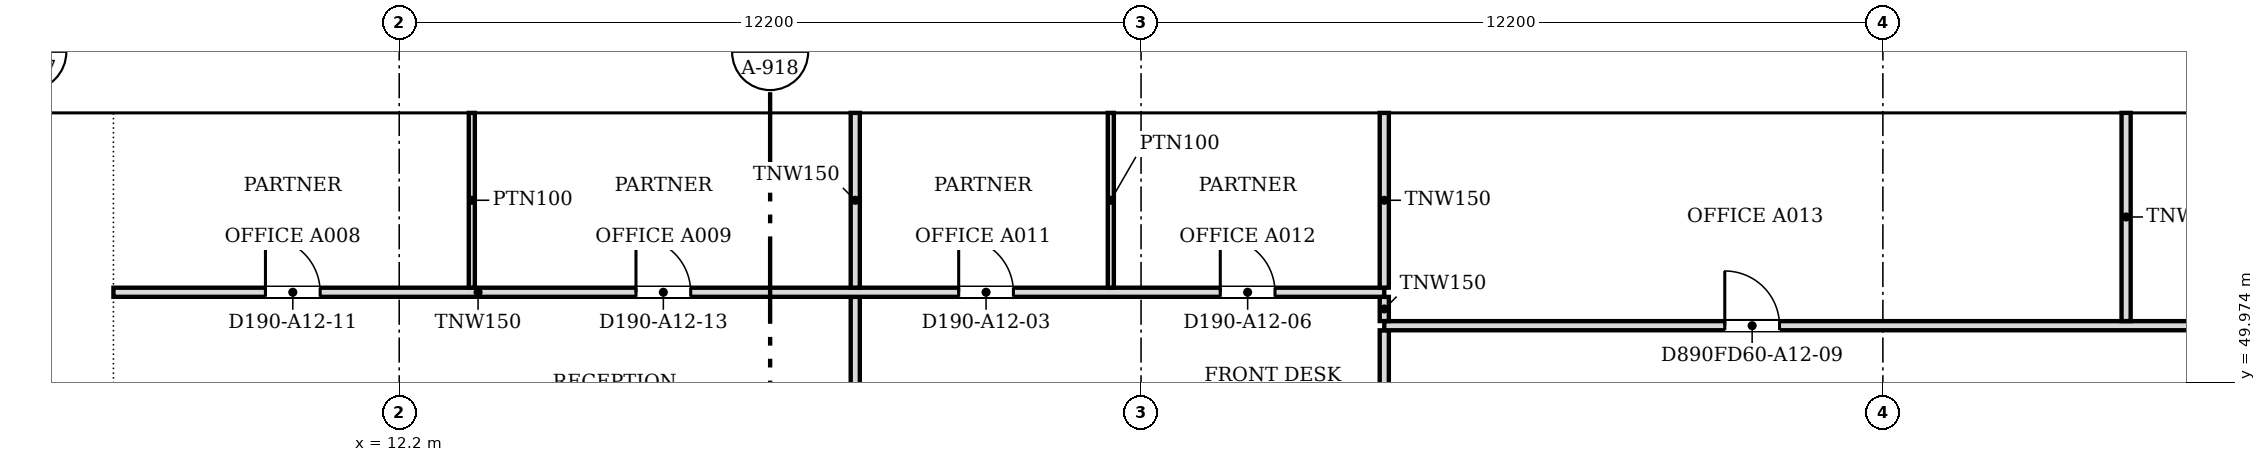
"""IFC4 building model, lengths in metres.
Left out: names, types, materials, properties, quantities, classifications, styles, units other than length and angle.
Written with IfcOpenShell. Run it as: python <this file> out.ifc"""

import sys

from ifc_helpers import new_model, si_unit, direction, frame, frame_2d, origin, place, context, subcontext, project, spatial, polyline, rectangle, outline, extrude, faceted_brep, source, transform, mapped, element, fill, save


model = new_model("IFC4")
c1 = context("Model", 3, precision=1e-05, world=origin(), true_north=direction((0.0, 1.0)))
c2 = subcontext(c1, "Body", "Model", "MODEL_VIEW")
j1 = project(units=[si_unit("LENGTHUNIT", "METRE"), si_unit("PLANEANGLEUNIT", "RADIAN")], contexts=[c1])
p1 = place(None, origin())
s1 = spatial("IfcSite", under=j1, at=p1, CompositionType="ELEMENT")
p2 = place(p1, origin())
s2 = spatial("IfcBuilding", under=s1, at=p2, CompositionType="ELEMENT")
p3 = place(p2, frame((0.0, 0.0, 135.4)))
s3 = spatial("IfcBuildingStorey", under=s2, at=p3, CompositionType="ELEMENT", Elevation=135.4)
m1 = source(origin(), c2, "Body", "SweptSolid", [
    extrude(outline(polyline([(3.05, 0.0), (6.1, 3.8), (3.05, 7.6), (0.0, 3.8), (3.05, 0.0)])), frame((0.0, 0.25, 0.0), z_axis=(0.0, -1.0, 0.0), x_axis=(1.0, 0.0, 0.0)), (0.0, 0.0, 1.0), 0.5),
])
p4 = place(p3, frame((45.75, 54.65, -3.8), z_axis=(0.0, 0.0, 1.0), x_axis=(-1.0, 0.0, 0.0)))
e1 = element("IfcWall", 1, at=p4, inside=s3, PredefinedType="SOLIDWALL", context=c2, shape_type="MappedRepresentation", body=[
    mapped(m1, transform((0.0, 0.0, 0.0), scale=1.0)),
])
m2 = source(origin(), c2, "Body", "SweptSolid", [
    extrude(outline(polyline([(3.05, 0.399), (5.78, 3.8), (3.05, 7.2), (0.321, 3.8), (3.05, 0.399)])), frame((0.0, 0.26, 0.0), z_axis=(0.0, -1.0, 0.0), x_axis=(1.0, 0.0, 0.0)), (0.0, 0.0, 1.0), 0.52),
])
p5 = place(p4, origin())
e2 = element("IfcOpeningElement", 2, at=p5, cuts=e1, PredefinedType="OPENING", context=c2, shape_type="MappedRepresentation", body=[
    mapped(m2, transform((0.0, 0.0, 0.0), scale=1.0)),
])
m3 = source(origin(), c2, "Body", "Brep", [
    faceted_brep([(3.05, -0.25, 0.0), (6.1, -0.25, 3.8), (6.1, -0.25, 3.8), (3.05, -0.25, 7.6), (0.0, -0.25, 3.8), (0.0, 0.25, 3.8), (3.05, 0.25, 7.6), (6.1, 0.25, 3.8), (6.1, 0.25, 3.8), (3.05, 0.25, 0.0)], [[[0, 1, 2, 3, 4]], [[5, 6, 7, 8, 9]], [[9, 8, 1, 0]], [[7, 6, 3, 2]], [[6, 5, 4, 3]], [[5, 9, 0, 4]], [[1, 8, 7, 2]]]),
])
p6 = place(p3, frame((39.65, 54.65, -3.8), z_axis=(0.0, 0.0, 1.0), x_axis=(-1.0, 0.0, 0.0)))
e3 = element("IfcWall", 3, at=p6, inside=s3, PredefinedType="SOLIDWALL", context=c2, shape_type="MappedRepresentation", body=[
    mapped(m3, transform((0.0, 0.0, 0.0), scale=1.0)),
])
p7 = place(p6, origin())
e4 = element("IfcOpeningElement", 4, at=p7, cuts=e3, PredefinedType="OPENING", context=c2, shape_type="MappedRepresentation", body=[
    mapped(m2, transform((0.0, 0.0, 0.0), scale=1.0)),
])
p8 = place(p3, frame((33.55, 54.65, -3.8), z_axis=(0.0, 0.0, 1.0), x_axis=(-1.0, 0.0, 0.0)))
e5 = element("IfcWall", 5, at=p8, inside=s3, PredefinedType="SOLIDWALL", context=c2, shape_type="MappedRepresentation", body=[
    mapped(m1, transform((0.0, 0.0, 0.0), scale=1.0)),
])
p9 = place(p8, origin())
e6 = element("IfcOpeningElement", 6, at=p9, cuts=e5, PredefinedType="OPENING", context=c2, shape_type="MappedRepresentation", body=[
    mapped(m2, transform((0.0, 0.0, 0.0), scale=1.0)),
])
p10 = place(p3, frame((27.45, 54.65, -3.8), z_axis=(0.0, 0.0, 1.0), x_axis=(-1.0, 0.0, 0.0)))
e7 = element("IfcWall", 7, at=p10, inside=s3, PredefinedType="SOLIDWALL", context=c2, shape_type="MappedRepresentation", body=[
    mapped(m3, transform((0.0, 0.0, 0.0), scale=1.0)),
])
p11 = place(p10, origin())
e8 = element("IfcOpeningElement", 8, at=p11, cuts=e7, PredefinedType="OPENING", context=c2, shape_type="MappedRepresentation", body=[
    mapped(m2, transform((0.0, 0.0, 0.0), scale=1.0)),
])
p12 = place(p3, frame((21.35, 54.65, -3.8), z_axis=(0.0, 0.0, 1.0), x_axis=(-1.0, 0.0, 0.0)))
e9 = element("IfcWall", 9, at=p12, inside=s3, PredefinedType="SOLIDWALL", context=c2, shape_type="MappedRepresentation", body=[
    mapped(m1, transform((0.0, 0.0, 0.0), scale=1.0)),
])
p13 = place(p12, origin())
e10 = element("IfcOpeningElement", 10, at=p13, cuts=e9, PredefinedType="OPENING", context=c2, shape_type="MappedRepresentation", body=[
    mapped(m2, transform((0.0, 0.0, 0.0), scale=1.0)),
])
p14 = place(p3, frame((15.25, 54.65, -3.8), z_axis=(0.0, 0.0, 1.0), x_axis=(-1.0, 0.0, 0.0)))
e11 = element("IfcWall", 11, at=p14, inside=s3, PredefinedType="SOLIDWALL", context=c2, shape_type="MappedRepresentation", body=[
    mapped(m1, transform((0.0, 0.0, 0.0), scale=1.0)),
])
p15 = place(p14, origin())
e12 = element("IfcOpeningElement", 12, at=p15, cuts=e11, PredefinedType="OPENING", context=c2, shape_type="MappedRepresentation", body=[
    mapped(m2, transform((0.0, 0.0, 0.0), scale=1.0)),
])
m4 = source(origin(), c2, "Body", "Brep", [
    faceted_brep([(3.003, -0.25, 0.0), (3.05, -0.25, 0.06), (3.05, -0.25, 7.54), (3.003, -0.25, 7.6), (0.0, -0.25, 3.8), (0.0, 0.25, 3.8), (2.957, 0.25, 7.541), (2.957, 0.25, 0.059), (3.003, 0.0, 0.0), (3.003, 0.0, 7.6)], [[[0, 1, 2, 3, 4]], [[5, 6, 7]], [[1, 0, 8]], [[9, 3, 2]], [[6, 5, 4, 3, 9]], [[5, 7, 8, 0, 4]], [[1, 8, 7, 6, 9, 2]]]),
])
p16 = place(p3, frame((9.15, 54.65, -3.8), z_axis=(0.0, 0.0, 1.0), x_axis=(-1.0, 0.0, 0.0)))
e13 = element("IfcWall", 13, at=p16, inside=s3, PredefinedType="SOLIDWALL", context=c2, shape_type="MappedRepresentation", body=[
    mapped(m4, transform((0.0, 0.0, 0.0), scale=1.0)),
])
m5 = source(origin(), c2, "Body", "SweptSolid", [
    extrude(outline(polyline([(2.803, 6.944), (0.319, 3.8), (2.803, 0.656), (2.803, 6.944)])), frame((0.0, 0.26, 0.0), z_axis=(0.0, -1.0, 0.0), x_axis=(1.0, 0.0, 0.0)), (0.0, 0.0, 1.0), 0.52),
])
p17 = place(p16, origin())
e14 = element("IfcOpeningElement", 14, at=p17, cuts=e13, PredefinedType="OPENING", context=c2, shape_type="MappedRepresentation", body=[
    mapped(m5, transform((0.0, 0.0, 0.0), scale=1.0)),
])
p18 = place(p2, frame((0.0, 0.0, 139.2)))
s4 = spatial("IfcBuildingStorey", under=s2, at=p18, CompositionType="ELEMENT", Elevation=139.2)
m6 = source(origin(), c2, "Body", "Brep", [
    faceted_brep([(3.05, -0.25, 0.0), (6.1, -0.25, 3.8), (6.1, -0.25, 3.8), (3.05, -0.25, 7.6), (0.0, -0.25, 3.8), (0.0, 0.25, 3.8), (3.05, 0.25, 7.6), (6.1, 0.25, 3.8), (6.1, 0.25, 3.8), (3.05, 0.25, 0.0)], [[[0, 1, 2, 3, 4]], [[5, 6, 7, 8, 9]], [[9, 8, 1, 0]], [[7, 6, 3, 2]], [[6, 5, 4, 3]], [[5, 9, 0, 4]], [[1, 8, 7, 2]]]),
])
p19 = place(p18, frame((42.7, 54.65, -3.8), z_axis=(0.0, 0.0, 1.0), x_axis=(-1.0, 0.0, 0.0)))
e15 = element("IfcWall", 15, at=p19, inside=s4, PredefinedType="SOLIDWALL", context=c2, shape_type="MappedRepresentation", body=[
    mapped(m6, transform((0.0, 0.0, 0.0), scale=1.0)),
])
m7 = source(origin(), c2, "Body", "SweptSolid", [
    extrude(outline(polyline([(3.05, 0.399), (5.78, 3.8), (3.05, 7.201), (0.321, 3.8), (3.05, 0.399)])), frame((0.0, 0.26, 0.0), z_axis=(0.0, -1.0, 0.0), x_axis=(1.0, 0.0, 0.0)), (0.0, 0.0, 1.0), 0.52),
])
p20 = place(p19, origin())
e16 = element("IfcOpeningElement", 16, at=p20, cuts=e15, PredefinedType="OPENING", context=c2, shape_type="MappedRepresentation", body=[
    mapped(m7, transform((0.0, 0.0, 0.0), scale=1.0)),
])
m8 = source(origin(), c2, "Body", "SweptSolid", [
    extrude(outline(polyline([(3.05, 0.0), (6.1, 3.8), (3.05, 7.6), (0.0, 3.8), (3.05, 0.0)])), frame((0.0, 0.25, 0.0), z_axis=(0.0, -1.0, 0.0), x_axis=(1.0, 0.0, 0.0)), (0.0, 0.0, 1.0), 0.5),
])
p21 = place(p18, frame((36.6, 54.65, -3.8), z_axis=(0.0, 0.0, 1.0), x_axis=(-1.0, 0.0, 0.0)))
e17 = element("IfcWall", 17, at=p21, inside=s4, PredefinedType="SOLIDWALL", context=c2, shape_type="MappedRepresentation", body=[
    mapped(m8, transform((0.0, 0.0, 0.0), scale=1.0)),
])
p22 = place(p21, origin())
e18 = element("IfcOpeningElement", 18, at=p22, cuts=e17, PredefinedType="OPENING", context=c2, shape_type="MappedRepresentation", body=[
    mapped(m7, transform((0.0, 0.0, 0.0), scale=1.0)),
])
p23 = place(p18, frame((30.5, 54.65, -3.8), z_axis=(0.0, 0.0, 1.0), x_axis=(-1.0, 0.0, 0.0)))
e19 = element("IfcWall", 19, at=p23, inside=s4, PredefinedType="SOLIDWALL", context=c2, shape_type="MappedRepresentation", body=[
    mapped(m8, transform((0.0, 0.0, 0.0), scale=1.0)),
])
p24 = place(p23, origin())
e20 = element("IfcOpeningElement", 20, at=p24, cuts=e19, PredefinedType="OPENING", context=c2, shape_type="MappedRepresentation", body=[
    mapped(m7, transform((0.0, 0.0, 0.0), scale=1.0)),
])
p25 = place(p18, frame((24.4, 54.65, -3.8), z_axis=(0.0, 0.0, 1.0), x_axis=(-1.0, 0.0, 0.0)))
e21 = element("IfcWall", 21, at=p25, inside=s4, PredefinedType="SOLIDWALL", context=c2, shape_type="MappedRepresentation", body=[
    mapped(m6, transform((0.0, 0.0, 0.0), scale=1.0)),
])
p26 = place(p25, origin())
e22 = element("IfcOpeningElement", 22, at=p26, cuts=e21, PredefinedType="OPENING", context=c2, shape_type="MappedRepresentation", body=[
    mapped(m7, transform((0.0, 0.0, 0.0), scale=1.0)),
])
p27 = place(p18, frame((18.3, 54.65, -3.8), z_axis=(0.0, 0.0, 1.0), x_axis=(-1.0, 0.0, 0.0)))
e23 = element("IfcWall", 23, at=p27, inside=s4, PredefinedType="SOLIDWALL", context=c2, shape_type="MappedRepresentation", body=[
    mapped(m8, transform((0.0, 0.0, 0.0), scale=1.0)),
])
p28 = place(p27, origin())
e24 = element("IfcOpeningElement", 24, at=p28, cuts=e23, PredefinedType="OPENING", context=c2, shape_type="MappedRepresentation", body=[
    mapped(m7, transform((0.0, 0.0, 0.0), scale=1.0)),
])
m9 = source(origin(), c2, "Body", "Brep", [
    faceted_brep([(3.05, -0.25, 0.0), (6.053, -0.25, 3.8), (3.05, -0.25, 7.6), (0.0, -0.25, 3.8), (0.0, 0.25, 3.8), (3.05, 0.25, 7.6), (6.007, 0.25, 3.859), (6.007, 0.25, 3.741), (3.05, 0.25, 0.0), (6.053, 0.0, 3.8)], [[[0, 1, 2, 3]], [[4, 5, 6, 7, 8]], [[8, 7, 9, 1, 0]], [[6, 5, 2, 1, 9]], [[5, 4, 3, 2]], [[4, 8, 0, 3]], [[9, 7, 6]]]),
])
p29 = place(p18, frame((12.2, 54.65, -3.8), z_axis=(0.0, 0.0, 1.0), x_axis=(-1.0, 0.0, 0.0)))
e25 = element("IfcWall", 25, at=p29, inside=s4, PredefinedType="SOLIDWALL", context=c2, shape_type="MappedRepresentation", body=[
    mapped(m9, transform((0.0, 0.0, 0.0), scale=1.0)),
])
m10 = source(origin(), c2, "Body", "SweptSolid", [
    extrude(outline(polyline([(3.049, 0.401), (5.735, 3.8), (3.049, 7.199), (0.321, 3.8), (3.049, 0.401)])), frame((0.0, 0.26, 0.0), z_axis=(0.0, -1.0, 0.0), x_axis=(1.0, 0.0, 0.0)), (0.0, 0.0, 1.0), 0.52),
])
p30 = place(p29, origin())
e26 = element("IfcOpeningElement", 26, at=p30, cuts=e25, PredefinedType="OPENING", context=c2, shape_type="MappedRepresentation", body=[
    mapped(m10, transform((0.0, 0.0, 0.0), scale=1.0)),
])
p31 = place(p3, frame((19.7, 48.176, 0.0), z_axis=(0.0, 0.0, 1.0), x_axis=(0.0, 1.0, 0.0)))
e27 = element("IfcWall", 27, at=p31, inside=s3, PredefinedType="PARTITIONING", context=c2, shape_type="SweptSolid", body=[
    extrude(rectangle(XDim=3.198, YDim=0.15, at=frame_2d((1.599, 0.0))), origin(), (0.0, 0.0, 1.0), 3.067),
])
p32 = place(p3, frame((28.4, 48.176, 0.0), z_axis=(0.0, 0.0, 1.0), x_axis=(0.0, 1.0, 0.0)))
e28 = element("IfcWall", 28, at=p32, inside=s3, PredefinedType="PARTITIONING", context=c2, shape_type="SweptSolid", body=[
    extrude(rectangle(XDim=2.648, YDim=0.15, at=frame_2d((1.324, 0.0))), origin(), (0.0, 0.0, 1.0), 3.067),
])
p33 = place(p3, frame((28.4, 50.9, 0.0), z_axis=(0.0, 0.0, 1.0), x_axis=(1.0, 0.0, 0.0)))
e29 = element("IfcWall", 29, at=p33, inside=s3, PredefinedType="PARTITIONING", context=c2, shape_type="SweptSolid", body=[
    extrude(rectangle(XDim=31.254, YDim=0.15, at=frame_2d((15.627, 0.0))), origin(), (0.0, 0.0, 1.0), 3.067),
])
m11 = source(origin(), c2, "Body", "SweptSolid", [
    extrude(rectangle(XDim=0.9, YDim=2.1, at=frame_2d((0.45, 1.05))), frame((0.0, 0.085, 0.0), z_axis=(0.0, -1.0, 0.0), x_axis=(1.0, 0.0, 0.0)), (0.0, 0.0, 1.0), 0.17),
])
p34 = place(p33, frame((5.6, 0.0, 0.0)))
e30 = element("IfcOpeningElement", 30, at=p34, cuts=e29, PredefinedType="OPENING", context=c2, shape_type="MappedRepresentation", body=[
    mapped(m11, transform((0.0, 0.0, 0.0), scale=1.0)),
])
p35 = place(p33, frame((21.3, 0.0, 0.0)))
e31 = element("IfcOpeningElement", 31, at=p35, cuts=e29, PredefinedType="OPENING", context=c2, shape_type="MappedRepresentation", body=[
    mapped(m11, transform((0.0, 0.0, 0.0), scale=1.0)),
])
p36 = place(p3, frame((28.4, 50.976, 0.0), z_axis=(0.0, 0.0, 1.0), x_axis=(0.0, 1.0, 0.0)))
e32 = element("IfcWall", 32, at=p36, inside=s3, PredefinedType="PARTITIONING", context=c2, shape_type="SweptSolid", body=[
    extrude(rectangle(XDim=0.398, YDim=0.15, at=frame_2d((0.199, 0.0))), origin(), (0.0, 0.0, 1.0), 3.067),
])
p37 = place(p3, frame((40.6, 50.976, 0.0), z_axis=(0.0, 0.0, 1.0), x_axis=(0.0, 1.0, 0.0)))
e33 = element("IfcWall", 33, at=p37, inside=s3, PredefinedType="PARTITIONING", context=c2, shape_type="SweptSolid", body=[
    extrude(rectangle(XDim=3.424, YDim=0.15, at=frame_2d((1.712, 0.0))), origin(), (0.0, 0.0, 1.0), 3.067),
])
p38 = place(p3, frame((7.5, 51.45, 0.0), z_axis=(0.0, 0.0, 1.0), x_axis=(1.0, 0.0, 0.0)))
e34 = element("IfcWall", 34, at=p38, inside=s3, PredefinedType="PARTITIONING", context=c2, shape_type="SweptSolid", body=[
    extrude(rectangle(XDim=20.9, YDim=0.15, at=frame_2d((10.45, 0.0))), origin(), (0.0, 0.0, 1.0), 3.067),
])
p39 = place(p38, frame((13.901, 0.0, 0.0)))
e35 = element("IfcOpeningElement", 35, at=p39, cuts=e34, PredefinedType="OPENING", context=c2, shape_type="MappedRepresentation", body=[
    mapped(m11, transform((0.0, 0.0, 0.0), scale=1.0)),
])
p40 = place(p38, frame((18.203, 0.0, 0.0)))
e36 = element("IfcOpeningElement", 36, at=p40, cuts=e34, PredefinedType="OPENING", context=c2, shape_type="MappedRepresentation", body=[
    mapped(m11, transform((0.0, 0.0, 0.0), scale=1.0)),
])
p41 = place(p38, frame((2.5, 0.0, 0.0)))
e37 = element("IfcOpeningElement", 37, at=p41, cuts=e34, PredefinedType="OPENING", context=c2, shape_type="MappedRepresentation", body=[
    mapped(m11, transform((0.0, 0.0, 0.0), scale=1.0)),
])
p42 = place(p38, frame((8.594, 0.0, 0.0)))
e38 = element("IfcOpeningElement", 38, at=p42, cuts=e34, PredefinedType="OPENING", context=c2, shape_type="MappedRepresentation", body=[
    mapped(m11, transform((0.0, 0.0, 0.0), scale=1.0)),
])
p43 = place(p3, frame((13.394, 51.526, 0.0), z_axis=(0.0, 0.0, 1.0), x_axis=(0.0, 1.0, 0.0)))
e39 = element("IfcWall", 39, at=p43, inside=s3, PredefinedType="PARTITIONING", context=c2, shape_type="SweptSolid", body=[
    extrude(rectangle(XDim=2.874, YDim=0.1, at=frame_2d((1.437, 0.0))), origin(), (0.0, 0.0, 1.0), 3.067),
])
p44 = place(p3, frame((19.7, 51.526, 0.0), z_axis=(0.0, 0.0, 1.0), x_axis=(0.0, 1.0, 0.0)))
e40 = element("IfcWall", 40, at=p44, inside=s3, PredefinedType="PARTITIONING", context=c2, shape_type="SweptSolid", body=[
    extrude(rectangle(XDim=2.874, YDim=0.15, at=frame_2d((1.437, 0.0))), origin(), (0.0, 0.0, 1.0), 3.067),
])
p45 = place(p3, frame((23.903, 51.526, 0.0), z_axis=(0.0, 0.0, 1.0), x_axis=(0.0, 1.0, 0.0)))
e41 = element("IfcWall", 41, at=p45, inside=s3, PredefinedType="PARTITIONING", context=c2, shape_type="SweptSolid", body=[
    extrude(rectangle(XDim=2.874, YDim=0.1, at=frame_2d((1.437, 0.0))), origin(), (0.0, 0.0, 1.0), 3.067),
])
p46 = place(p3, frame((28.4, 51.526, 0.0), z_axis=(0.0, 0.0, 1.0), x_axis=(0.0, 1.0, 0.0)))
e42 = element("IfcWall", 42, at=p46, inside=s3, PredefinedType="PARTITIONING", context=c2, shape_type="SweptSolid", body=[
    extrude(rectangle(XDim=2.874, YDim=0.15, at=frame_2d((1.437, 0.0))), origin(), (0.0, 0.0, 1.0), 3.067),
])
m12 = source(origin(), c2, "Body", "SweptSolid", [
    extrude(rectangle(XDim=0.9, YDim=2.1, at=frame_2d((0.45, 1.05))), frame((0.0, 0.025, 0.0), z_axis=(0.0, -1.0, 0.0), x_axis=(1.0, 0.0, 0.0)), (0.0, 0.0, 1.0), 0.05),
])
p47 = place(p39, origin())
e43 = element("IfcDoor", 43, at=p47, inside=s3, OperationType="SINGLE_SWING_LEFT", PredefinedType="DOOR", context=c2, shape_type="MappedRepresentation", body=[
    mapped(m12, transform((0.0, 0.0, 0.0), scale=1.0)),
])
fill(e35, e43)
p48 = place(p40, origin())
e44 = element("IfcDoor", 44, at=p48, inside=s3, OperationType="SINGLE_SWING_LEFT", PredefinedType="DOOR", context=c2, shape_type="MappedRepresentation", body=[
    mapped(m12, transform((0.0, 0.0, 0.0), scale=1.0)),
])
fill(e36, e44)
p49 = place(p41, origin())
e45 = element("IfcDoor", 45, at=p49, inside=s3, OperationType="SINGLE_SWING_LEFT", PredefinedType="DOOR", context=c2, shape_type="MappedRepresentation", body=[
    mapped(m12, transform((0.0, 0.0, 0.0), scale=1.0)),
])
fill(e37, e45)
p50 = place(p42, origin())
e46 = element("IfcDoor", 46, at=p50, inside=s3, OperationType="SINGLE_SWING_LEFT", PredefinedType="DOOR", context=c2, shape_type="MappedRepresentation", body=[
    mapped(m12, transform((0.0, 0.0, 0.0), scale=1.0)),
])
fill(e38, e46)
p51 = place(p34, origin())
e47 = element("IfcDoor", 47, at=p51, inside=s3, OperationType="SINGLE_SWING_LEFT", PredefinedType="DOOR", context=c2, shape_type="MappedRepresentation", body=[
    mapped(m12, transform((0.0, 0.0, 0.0), scale=1.0)),
])
fill(e30, e47)
save(model, sys.argv[1])
